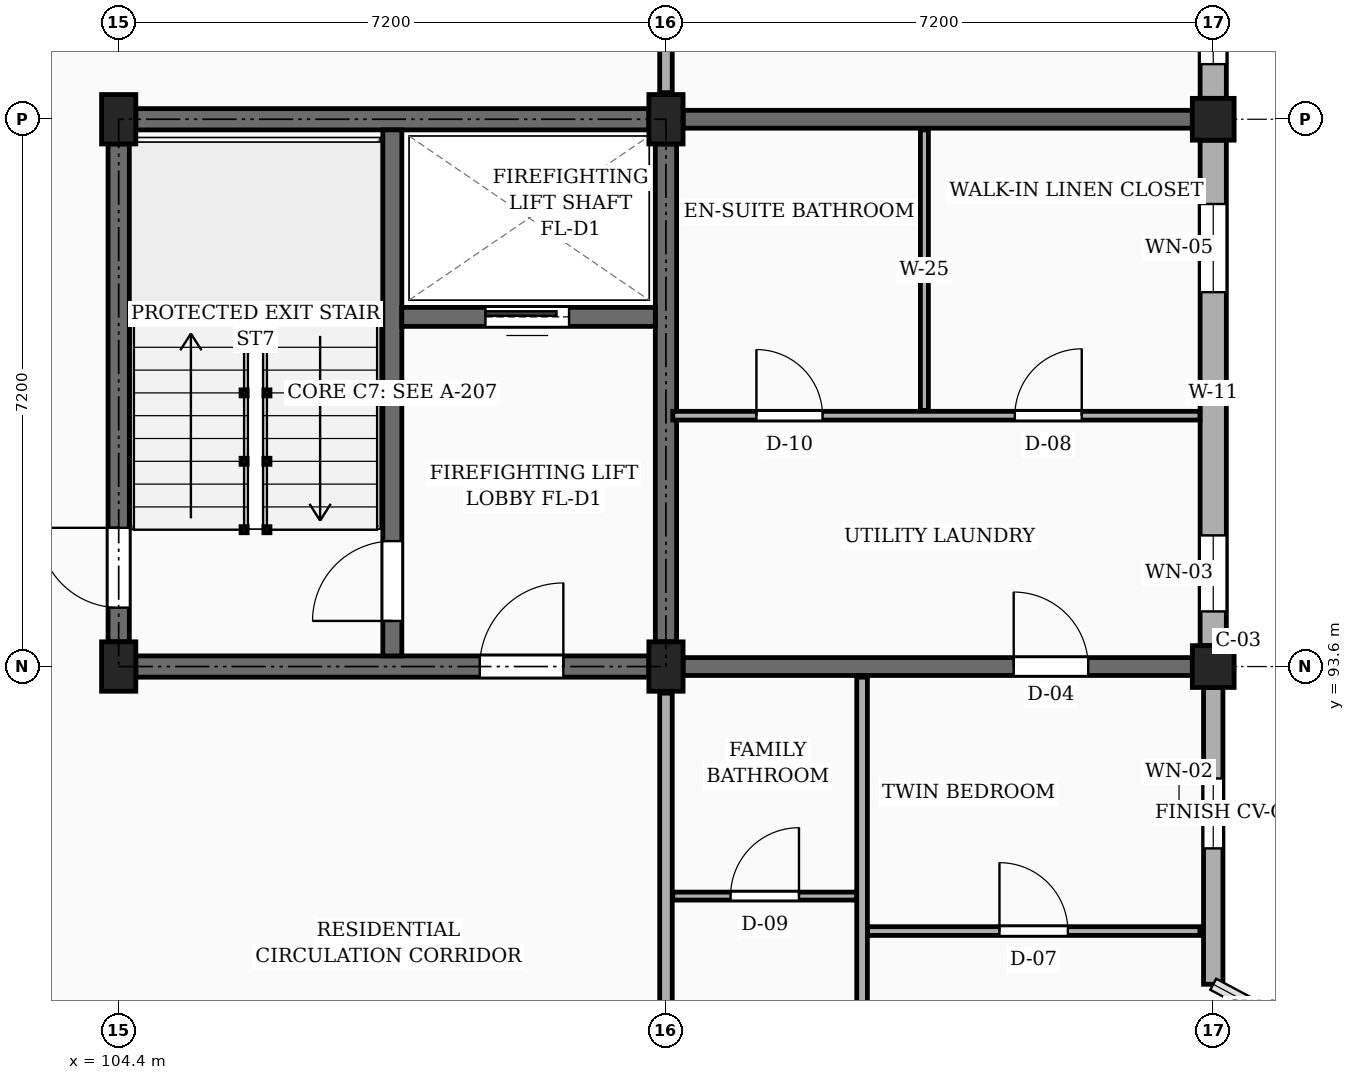
"""IFC4 building model, lengths in metres.
Left out: names, types, materials, properties, quantities, classifications, styles, units other than length and angle.
Written with IfcOpenShell. Run it as: python <this file> out.ifc"""

import sys

from ifc_helpers import new_model, si_unit, direction, frame, frame_2d, origin, origin_2d, place, context, subcontext, project, spatial, rectangle, extrude, element, fill, save


model = new_model("IFC4")
c1 = context("Model", 3, precision=1e-05, world=origin(), true_north=direction((0.0, 1.0)))
c2 = subcontext(c1, "Body", "Model", "MODEL_VIEW")
j1 = project(units=[si_unit("LENGTHUNIT", "METRE"), si_unit("PLANEANGLEUNIT", "RADIAN")], contexts=[c1])
p1 = place(None, origin())
s1 = spatial("IfcSite", under=j1, at=p1, CompositionType="ELEMENT")
p2 = place(p1, origin())
s2 = spatial("IfcBuilding", under=s1, at=p2, CompositionType="ELEMENT")
p3 = place(p2, frame((0.0, 0.0, 17.1)))
s3 = spatial("IfcBuildingStorey", under=s2, at=p3, CompositionType="ELEMENT", Elevation=17.1)
for number, where, z_axis, x_axis in (
    (1, (104.4, 93.6, 0.0), (0.0, 0.0, 1.0), (1.0, 0.0, 0.0)),
    (2, (104.4, 100.8, 0.0), (0.0, 0.0, 1.0), (1.0, 0.0, 0.0)),
    (3, (111.6, 93.6, 0.0), (0.0, 0.0, 1.0), (1.0, 0.0, 0.0)),
    (4, (111.6, 100.8, 0.0), (0.0, 0.0, 1.0), (1.0, 0.0, 0.0)),
):
    element("IfcColumn", number, at=place(p3, frame(where, z_axis=z_axis, x_axis=x_axis)), inside=s3, PredefinedType="COLUMN", context=c2, shape_type="SweptSolid", body=[
        extrude(rectangle(XDim=0.45, YDim=0.65, at=origin_2d()), origin(), (0.0, 0.0, 1.0), 3.15),
    ])
for number, where, z_axis, x_axis in (
    (5, (118.8, 93.6, 0.0), (0.0, 0.0, 1.0), (1.0, 0.0, 0.0)),
    (6, (118.8, 100.8, 0.0), (0.0, 0.0, 1.0), (1.0, 0.0, 0.0)),
):
    element("IfcColumn", number, at=place(p3, frame(where, z_axis=z_axis, x_axis=x_axis)), inside=s3, PredefinedType="COLUMN", context=c2, shape_type="SweptSolid", body=[
        extrude(rectangle(XDim=0.55, YDim=0.55, at=origin_2d()), origin(), (0.0, 0.0, 1.0), 3.15),
    ])
p4 = place(p3, frame((111.825, 93.6, 0.0), z_axis=(0.0, 0.0, 1.0), x_axis=(1.0, 0.0, 0.0)))
e7 = element("IfcWall", 7, at=p4, inside=s3, PredefinedType="SOLIDWALL", context=c2, shape_type="SweptSolid", body=[
    extrude(rectangle(XDim=6.7, YDim=0.235, at=frame_2d((3.35, 0.0))), origin(), (0.0, 0.0, 1.0), 2.19),
])
p5 = place(p4, frame((4.35, 0.0, 0.0)))
e8 = element("IfcOpeningElement", 8, at=p5, cuts=e7, PredefinedType="OPENING", context=c2, shape_type="SweptSolid", body=[
    extrude(rectangle(XDim=0.98, YDim=2.12, at=frame_2d((0.49, 1.06))), frame((0.0, 0.127, 0.0), z_axis=(0.0, -1.0, 0.0), x_axis=(1.0, 0.0, 0.0)), (0.0, 0.0, 1.0), 0.255),
])
p6 = place(p3, frame((111.825, 100.8, 0.0), z_axis=(0.0, 0.0, 1.0), x_axis=(1.0, 0.0, 0.0)))
e9 = element("IfcWall", 9, at=p6, inside=s3, PredefinedType="SOLIDWALL", context=c2, shape_type="SweptSolid", body=[
    extrude(rectangle(XDim=6.7, YDim=0.235, at=frame_2d((3.35, 0.0))), origin(), (0.0, 0.0, 1.0), 2.19),
])
p7 = place(p3, frame((118.8, 89.42, 0.0), z_axis=(0.0, 0.0, 1.0), x_axis=(0.0, 1.0, 0.0)))
e10 = element("IfcWall", 10, at=p7, inside=s3, PredefinedType="SOLIDWALL", context=c2, shape_type="SweptSolid", body=[
    extrude(rectangle(XDim=3.905, YDim=0.255, at=frame_2d((1.953, 0.0))), origin(), (0.0, 0.0, 1.0), 2.46),
])
p8 = place(p7, frame((1.788, 0.0, 0.78)))
e11 = element("IfcOpeningElement", 11, at=p8, cuts=e10, PredefinedType="OPENING", context=c2, shape_type="SweptSolid", body=[
    extrude(rectangle(XDim=0.92, YDim=1.15, at=frame_2d((0.46, 0.575))), frame((0.0, 0.137, 0.0), z_axis=(0.0, -1.0, 0.0), x_axis=(1.0, 0.0, 0.0)), (0.0, 0.0, 1.0), 0.275),
])
p9 = place(p3, frame((118.8, 93.875, 0.0), z_axis=(0.0, 0.0, 1.0), x_axis=(0.0, 1.0, 0.0)))
e12 = element("IfcWall", 12, at=p9, inside=s3, PredefinedType="SOLIDWALL", context=c2, shape_type="SweptSolid", body=[
    extrude(rectangle(XDim=6.65, YDim=0.345, at=frame_2d((3.325, 0.0))), origin(), (0.0, 0.0, 1.0), 2.46),
])
p10 = place(p9, frame((0.45, 0.0, 0.78)))
e13 = element("IfcOpeningElement", 13, at=p10, cuts=e12, PredefinedType="OPENING", context=c2, shape_type="SweptSolid", body=[
    extrude(rectangle(XDim=1.0, YDim=1.15, at=frame_2d((0.5, 0.575))), frame((0.0, 0.183, 0.0), z_axis=(0.0, -1.0, 0.0), x_axis=(1.0, 0.0, 0.0)), (0.0, 0.0, 1.0), 0.365),
])
p11 = place(p9, frame((4.65, 0.0, 0.78)))
e14 = element("IfcOpeningElement", 14, at=p11, cuts=e12, PredefinedType="OPENING", context=c2, shape_type="SweptSolid", body=[
    extrude(rectangle(XDim=1.16, YDim=1.15, at=frame_2d((0.58, 0.575))), frame((0.0, 0.183, 0.0), z_axis=(0.0, -1.0, 0.0), x_axis=(1.0, 0.0, 0.0)), (0.0, 0.0, 1.0), 0.365),
])
p12 = place(p3, frame((118.8, 101.075, 0.0), z_axis=(0.0, 0.0, 1.0), x_axis=(0.0, 1.0, 0.0)))
e15 = element("IfcWall", 15, at=p12, inside=s3, PredefinedType="SOLIDWALL", context=c2, shape_type="SweptSolid", body=[
    extrude(rectangle(XDim=6.65, YDim=0.345, at=frame_2d((3.325, 0.0))), origin(), (0.0, 0.0, 1.0), 2.46),
])
p13 = place(p12, frame((0.45, 0.0, 0.78)))
e16 = element("IfcOpeningElement", 16, at=p13, cuts=e15, PredefinedType="OPENING", context=c2, shape_type="SweptSolid", body=[
    extrude(rectangle(XDim=1.16, YDim=1.15, at=frame_2d((0.58, 0.575))), frame((0.0, 0.183, 0.0), z_axis=(0.0, -1.0, 0.0), x_axis=(1.0, 0.0, 0.0)), (0.0, 0.0, 1.0), 0.365),
])
p14 = place(p12, frame((4.65, 0.0, 0.78)))
e17 = element("IfcOpeningElement", 17, at=p14, cuts=e15, PredefinedType="OPENING", context=c2, shape_type="SweptSolid", body=[
    extrude(rectangle(XDim=1.32, YDim=1.15, at=frame_2d((0.66, 0.575))), frame((0.0, 0.183, 0.0), z_axis=(0.0, -1.0, 0.0), x_axis=(1.0, 0.0, 0.0)), (0.0, 0.0, 1.0), 0.365),
])
p15 = place(p3, frame((104.4, 93.925, 0.0), z_axis=(0.0, 0.0, 1.0), x_axis=(0.0, 1.0, 0.0)))
e18 = element("IfcWall", 18, at=p15, inside=s3, PredefinedType="SHEAR", context=c2, shape_type="SweptSolid", body=[
    extrude(rectangle(XDim=6.55, YDim=0.28, at=frame_2d((3.275, 0.0))), origin(), (0.0, 0.0, 1.0), 2.89),
])
p16 = place(p15, frame((0.45, 0.0, 0.0)))
e19 = element("IfcOpeningElement", 19, at=p16, cuts=e18, PredefinedType="OPENING", context=c2, shape_type="SweptSolid", body=[
    extrude(rectangle(XDim=1.05, YDim=2.15, at=frame_2d((0.525, 1.075))), frame((0.0, 0.15, 0.0), z_axis=(0.0, -1.0, 0.0), x_axis=(1.0, 0.0, 0.0)), (0.0, 0.0, 1.0), 0.3),
])
p17 = place(p3, frame((104.625, 100.8, 0.0), z_axis=(0.0, 0.0, 1.0), x_axis=(1.0, 0.0, 0.0)))
e20 = element("IfcWall", 20, at=p17, inside=s3, PredefinedType="SHEAR", context=c2, shape_type="SweptSolid", body=[
    extrude(rectangle(XDim=6.75, YDim=0.28, at=frame_2d((3.375, 0.0))), origin(), (0.0, 0.0, 1.0), 2.89),
])
p18 = place(p3, frame((111.6, 93.925, 0.0), z_axis=(0.0, 0.0, 1.0), x_axis=(0.0, 1.0, 0.0)))
e21 = element("IfcWall", 21, at=p18, inside=s3, PredefinedType="SHEAR", context=c2, shape_type="SweptSolid", body=[
    extrude(rectangle(XDim=6.55, YDim=0.28, at=frame_2d((3.275, 0.0))), origin(), (0.0, 0.0, 1.0), 2.89),
])
p19 = place(p3, frame((104.625, 93.6, 0.0), z_axis=(0.0, 0.0, 1.0), x_axis=(1.0, 0.0, 0.0)))
e22 = element("IfcWall", 22, at=p19, inside=s3, PredefinedType="SHEAR", context=c2, shape_type="SweptSolid", body=[
    extrude(rectangle(XDim=6.75, YDim=0.28, at=frame_2d((3.375, 0.0))), origin(), (0.0, 0.0, 1.0), 2.89),
])
p20 = place(p19, frame((4.525, 0.0, 0.0)))
e23 = element("IfcOpeningElement", 23, at=p20, cuts=e22, PredefinedType="OPENING", context=c2, shape_type="SweptSolid", body=[
    extrude(rectangle(XDim=1.1, YDim=2.15, at=frame_2d((0.55, 1.075))), frame((0.0, 0.15, 0.0), z_axis=(0.0, -1.0, 0.0), x_axis=(1.0, 0.0, 0.0)), (0.0, 0.0, 1.0), 0.3),
])
p21 = place(p3, frame((108.0, 93.74, 0.0), z_axis=(0.0, 0.0, 1.0), x_axis=(0.0, 1.0, 0.0)))
e24 = element("IfcWall", 24, at=p21, inside=s3, PredefinedType="SHEAR", context=c2, shape_type="SweptSolid", body=[
    extrude(rectangle(XDim=6.92, YDim=0.25, at=frame_2d((3.46, 0.0))), origin(), (0.0, 0.0, 1.0), 2.89),
])
p22 = place(p21, frame((0.46, 0.0, 0.0)))
e25 = element("IfcOpeningElement", 25, at=p22, cuts=e24, PredefinedType="OPENING", context=c2, shape_type="SweptSolid", body=[
    extrude(rectangle(XDim=1.05, YDim=2.15, at=frame_2d((0.525, 1.075))), frame((0.0, 0.135, 0.0), z_axis=(0.0, -1.0, 0.0), x_axis=(1.0, 0.0, 0.0)), (0.0, 0.0, 1.0), 0.27),
])
p23 = place(p3, frame((108.125, 98.2, 0.0), z_axis=(0.0, 0.0, 1.0), x_axis=(1.0, 0.0, 0.0)))
e26 = element("IfcWall", 26, at=p23, inside=s3, PredefinedType="SHEAR", context=c2, shape_type="SweptSolid", body=[
    extrude(rectangle(XDim=3.335, YDim=0.25, at=frame_2d((1.667, 0.0))), origin(), (0.0, 0.0, 1.0), 2.89),
])
p24 = place(p23, frame((1.1, 0.0, 0.0)))
e27 = element("IfcOpeningElement", 27, at=p24, cuts=e26, PredefinedType="OPENING", context=c2, shape_type="SweptSolid", body=[
    extrude(rectangle(XDim=1.1, YDim=2.2, at=frame_2d((0.55, 1.1))), frame((0.0, 0.135, 0.0), z_axis=(0.0, -1.0, 0.0), x_axis=(1.0, 0.0, 0.0)), (0.0, 0.0, 1.0), 0.27),
])
p25 = place(p3, frame((111.6, 86.75, 0.0), z_axis=(0.0, 0.0, 1.0), x_axis=(0.0, 1.0, 0.0)))
e28 = element("IfcWall", 28, at=p25, inside=s3, PredefinedType="PARTITIONING", context=c2, shape_type="SweptSolid", body=[
    extrude(rectangle(XDim=6.5, YDim=0.165, at=frame_2d((3.25, 0.0))), origin(), (0.0, 0.0, 1.0), 2.325),
])
p26 = place(p25, frame((1.0, 0.0, 0.0)))
e29 = element("IfcOpeningElement", 29, at=p26, cuts=e28, PredefinedType="OPENING", context=c2, shape_type="SweptSolid", body=[
    extrude(rectangle(XDim=1.14, YDim=2.18, at=frame_2d((0.57, 1.09))), frame((0.0, 0.093, 0.0), z_axis=(0.0, -1.0, 0.0), x_axis=(1.0, 0.0, 0.0)), (0.0, 0.0, 1.0), 0.185),
])
p27 = place(p3, frame((111.6, 101.15, 0.0), z_axis=(0.0, 0.0, 1.0), x_axis=(0.0, 1.0, 0.0)))
e30 = element("IfcWall", 30, at=p27, inside=s3, PredefinedType="PARTITIONING", context=c2, shape_type="SweptSolid", body=[
    extrude(rectangle(XDim=6.5, YDim=0.165, at=frame_2d((3.25, 0.0))), origin(), (0.0, 0.0, 1.0), 2.325),
])
p28 = place(p27, frame((1.1, 0.0, 0.0)))
e31 = element("IfcOpeningElement", 31, at=p28, cuts=e30, PredefinedType="OPENING", context=c2, shape_type="SweptSolid", body=[
    extrude(rectangle(XDim=1.0, YDim=2.15, at=frame_2d((0.5, 1.075))), frame((0.0, 0.093, 0.0), z_axis=(0.0, -1.0, 0.0), x_axis=(1.0, 0.0, 0.0)), (0.0, 0.0, 1.0), 0.185),
])
p29 = place(p3, frame((114.25, 90.12, 0.0), z_axis=(0.0, 0.0, 1.0), x_axis=(1.0, 0.0, 0.0)))
e32 = element("IfcWall", 32, at=p29, inside=s3, PredefinedType="PARTITIONING", context=c2, shape_type="SweptSolid", body=[
    extrude(rectangle(XDim=4.375, YDim=0.115, at=frame_2d((2.188, 0.0))), origin(), (0.0, 0.0, 1.0), 2.325),
])
p30 = place(p29, frame((1.738, 0.0, 0.0)))
e33 = element("IfcOpeningElement", 33, at=p30, cuts=e32, PredefinedType="OPENING", context=c2, shape_type="SweptSolid", body=[
    extrude(rectangle(XDim=0.9, YDim=2.1, at=frame_2d((0.45, 1.05))), frame((0.0, 0.067, 0.0), z_axis=(0.0, -1.0, 0.0), x_axis=(1.0, 0.0, 0.0)), (0.0, 0.0, 1.0), 0.135),
])
p31 = place(p3, frame((111.69, 90.58, 0.0), z_axis=(0.0, 0.0, 1.0), x_axis=(1.0, 0.0, 0.0)))
e34 = element("IfcWall", 34, at=p31, inside=s3, PredefinedType="PARTITIONING", context=c2, shape_type="SweptSolid", body=[
    extrude(rectangle(XDim=2.42, YDim=0.105, at=frame_2d((1.21, 0.0))), origin(), (0.0, 0.0, 1.0), 2.325),
])
p32 = place(p31, frame((0.76, 0.0, 0.0)))
e35 = element("IfcOpeningElement", 35, at=p32, cuts=e34, PredefinedType="OPENING", context=c2, shape_type="SweptSolid", body=[
    extrude(rectangle(XDim=0.9, YDim=2.05, at=frame_2d((0.45, 1.025))), frame((0.0, 0.062, 0.0), z_axis=(0.0, -1.0, 0.0), x_axis=(1.0, 0.0, 0.0)), (0.0, 0.0, 1.0), 0.125),
])
p33 = place(p3, frame((114.18, 86.575, 0.0), z_axis=(0.0, 0.0, 1.0), x_axis=(0.0, 1.0, 0.0)))
e36 = element("IfcWall", 36, at=p33, inside=s3, PredefinedType="PARTITIONING", context=c2, shape_type="SweptSolid", body=[
    extrude(rectangle(XDim=6.885, YDim=0.14, at=frame_2d((3.442, 0.0))), origin(), (0.0, 0.0, 1.0), 2.325),
])
p34 = place(p33, frame((1.275, 0.0, 0.0)))
e37 = element("IfcOpeningElement", 37, at=p34, cuts=e36, PredefinedType="OPENING", context=c2, shape_type="SweptSolid", body=[
    extrude(rectangle(XDim=0.95, YDim=2.1, at=frame_2d((0.475, 1.05))), frame((0.0, 0.08, 0.0), z_axis=(0.0, -1.0, 0.0), x_axis=(1.0, 0.0, 0.0)), (0.0, 0.0, 1.0), 0.16),
])
p35 = place(p3, frame((111.69, 96.9, 0.0), z_axis=(0.0, 0.0, 1.0), x_axis=(1.0, 0.0, 0.0)))
e38 = element("IfcWall", 38, at=p35, inside=s3, PredefinedType="PARTITIONING", context=c2, shape_type="SweptSolid", body=[
    extrude(rectangle(XDim=6.935, YDim=0.115, at=frame_2d((3.468, 0.0))), origin(), (0.0, 0.0, 1.0), 2.325),
])
p36 = place(p35, frame((1.1, 0.0, 0.0)))
e39 = element("IfcOpeningElement", 39, at=p36, cuts=e38, PredefinedType="OPENING", context=c2, shape_type="SweptSolid", body=[
    extrude(rectangle(XDim=0.87, YDim=2.05, at=frame_2d((0.435, 1.025))), frame((0.0, 0.067, 0.0), z_axis=(0.0, -1.0, 0.0), x_axis=(1.0, 0.0, 0.0)), (0.0, 0.0, 1.0), 0.135),
])
p37 = place(p35, frame((4.5, 0.0, 0.0)))
e40 = element("IfcOpeningElement", 40, at=p37, cuts=e38, PredefinedType="OPENING", context=c2, shape_type="SweptSolid", body=[
    extrude(rectangle(XDim=0.88, YDim=2.08, at=frame_2d((0.44, 1.04))), frame((0.0, 0.067, 0.0), z_axis=(0.0, -1.0, 0.0), x_axis=(1.0, 0.0, 0.0)), (0.0, 0.0, 1.0), 0.135),
])
p38 = place(p3, frame((115.0, 96.97, 0.0), z_axis=(0.0, 0.0, 1.0), x_axis=(0.0, 1.0, 0.0)))
e41 = element("IfcWall", 41, at=p38, inside=s3, PredefinedType="PARTITIONING", context=c2, shape_type="SweptSolid", body=[
    extrude(rectangle(XDim=3.69, YDim=0.105, at=frame_2d((1.845, 0.0))), origin(), (0.0, 0.0, 1.0), 2.325),
])
p39 = place(p8, origin())
e42 = element("IfcWindow", 42, at=p39, inside=s3, PartitioningType="SINGLE_PANEL", PredefinedType="WINDOW", context=c2, shape_type="SweptSolid", body=[
    extrude(rectangle(XDim=0.92, YDim=1.15, at=frame_2d((0.46, 0.575))), frame((0.0, 0.03, 0.0), z_axis=(0.0, -1.0, 0.0), x_axis=(1.0, 0.0, 0.0)), (0.0, 0.0, 1.0), 0.06),
])
fill(e11, e42)
p40 = place(p10, origin())
e43 = element("IfcWindow", 43, at=p40, inside=s3, PartitioningType="SINGLE_PANEL", PredefinedType="WINDOW", context=c2, shape_type="SweptSolid", body=[
    extrude(rectangle(XDim=1.0, YDim=1.15, at=frame_2d((0.5, 0.575))), frame((0.0, 0.03, 0.0), z_axis=(0.0, -1.0, 0.0), x_axis=(1.0, 0.0, 0.0)), (0.0, 0.0, 1.0), 0.06),
])
fill(e13, e43)
p41 = place(p11, origin())
e44 = element("IfcWindow", 44, at=p41, inside=s3, PartitioningType="SINGLE_PANEL", PredefinedType="WINDOW", context=c2, shape_type="SweptSolid", body=[
    extrude(rectangle(XDim=1.16, YDim=1.15, at=frame_2d((0.58, 0.575))), frame((0.0, 0.03, 0.0), z_axis=(0.0, -1.0, 0.0), x_axis=(1.0, 0.0, 0.0)), (0.0, 0.0, 1.0), 0.06),
])
fill(e14, e44)
p42 = place(p13, origin())
e45 = element("IfcWindow", 45, at=p42, inside=s3, PartitioningType="SINGLE_PANEL", PredefinedType="WINDOW", context=c2, shape_type="SweptSolid", body=[
    extrude(rectangle(XDim=1.16, YDim=1.15, at=frame_2d((0.58, 0.575))), frame((0.0, 0.03, 0.0), z_axis=(0.0, -1.0, 0.0), x_axis=(1.0, 0.0, 0.0)), (0.0, 0.0, 1.0), 0.06),
])
fill(e16, e45)
p43 = place(p16, origin())
e46 = element("IfcDoor", 46, at=p43, inside=s3, OperationType="SINGLE_SWING_RIGHT", PredefinedType="DOOR", context=c2, shape_type="SweptSolid", body=[
    extrude(rectangle(XDim=1.05, YDim=2.15, at=frame_2d((0.525, 1.075))), frame((0.0, 0.025, 0.0), z_axis=(0.0, -1.0, 0.0), x_axis=(1.0, 0.0, 0.0)), (0.0, 0.0, 1.0), 0.05),
])
fill(e19, e46)
p44 = place(p20, frame((1.1, 0.0, 0.0), z_axis=(0.0, 0.0, 1.0), x_axis=(-1.0, 0.0, 0.0)))
e47 = element("IfcDoor", 47, at=p44, inside=s3, OperationType="SINGLE_SWING_RIGHT", PredefinedType="DOOR", context=c2, shape_type="SweptSolid", body=[
    extrude(rectangle(XDim=1.1, YDim=2.15, at=frame_2d((0.55, 1.075))), frame((0.0, 0.025, 0.0), z_axis=(0.0, -1.0, 0.0), x_axis=(1.0, 0.0, 0.0)), (0.0, 0.0, 1.0), 0.05),
])
fill(e23, e47)
p45 = place(p22, origin())
e48 = element("IfcDoor", 48, at=p45, inside=s3, OperationType="SINGLE_SWING_LEFT", PredefinedType="DOOR", context=c2, shape_type="SweptSolid", body=[
    extrude(rectangle(XDim=1.05, YDim=2.15, at=frame_2d((0.525, 1.075))), frame((0.0, 0.025, 0.0), z_axis=(0.0, -1.0, 0.0), x_axis=(1.0, 0.0, 0.0)), (0.0, 0.0, 1.0), 0.05),
])
fill(e25, e48)
p46 = place(p24, origin())
e49 = element("IfcDoor", 49, at=p46, inside=s3, OperationType="SLIDING_TO_LEFT", PredefinedType="DOOR", context=c2, shape_type="SweptSolid", body=[
    extrude(rectangle(XDim=1.1, YDim=2.2, at=frame_2d((0.55, 1.1))), frame((0.0, 0.025, 0.0), z_axis=(0.0, -1.0, 0.0), x_axis=(1.0, 0.0, 0.0)), (0.0, 0.0, 1.0), 0.05),
])
fill(e27, e49)
p47 = place(p30, origin())
e50 = element("IfcDoor", 50, at=p47, inside=s3, OperationType="SINGLE_SWING_LEFT", PredefinedType="DOOR", context=c2, shape_type="SweptSolid", body=[
    extrude(rectangle(XDim=0.9, YDim=2.1, at=frame_2d((0.45, 1.05))), frame((0.0, 0.025, 0.0), z_axis=(0.0, -1.0, 0.0), x_axis=(1.0, 0.0, 0.0)), (0.0, 0.0, 1.0), 0.05),
])
fill(e33, e50)
p48 = place(p32, origin())
e51 = element("IfcDoor", 51, at=p48, inside=s3, OperationType="SINGLE_SWING_RIGHT", PredefinedType="DOOR", context=c2, shape_type="SweptSolid", body=[
    extrude(rectangle(XDim=0.9, YDim=2.05, at=frame_2d((0.45, 1.025))), frame((0.0, 0.025, 0.0), z_axis=(0.0, -1.0, 0.0), x_axis=(1.0, 0.0, 0.0)), (0.0, 0.0, 1.0), 0.05),
])
fill(e35, e51)
p49 = place(p36, origin())
e52 = element("IfcDoor", 52, at=p49, inside=s3, OperationType="SINGLE_SWING_LEFT", PredefinedType="DOOR", context=c2, shape_type="SweptSolid", body=[
    extrude(rectangle(XDim=0.87, YDim=2.05, at=frame_2d((0.435, 1.025))), frame((0.0, 0.025, 0.0), z_axis=(0.0, -1.0, 0.0), x_axis=(1.0, 0.0, 0.0)), (0.0, 0.0, 1.0), 0.05),
])
fill(e39, e52)
p50 = place(p37, origin())
e53 = element("IfcDoor", 53, at=p50, inside=s3, OperationType="SINGLE_SWING_RIGHT", PredefinedType="DOOR", context=c2, shape_type="SweptSolid", body=[
    extrude(rectangle(XDim=0.88, YDim=2.08, at=frame_2d((0.44, 1.04))), frame((0.0, 0.025, 0.0), z_axis=(0.0, -1.0, 0.0), x_axis=(1.0, 0.0, 0.0)), (0.0, 0.0, 1.0), 0.05),
])
fill(e40, e53)
p51 = place(p5, origin())
e54 = element("IfcDoor", 54, at=p51, inside=s3, OperationType="SINGLE_SWING_LEFT", PredefinedType="DOOR", context=c2, shape_type="SweptSolid", body=[
    extrude(rectangle(XDim=0.98, YDim=2.12, at=frame_2d((0.49, 1.06))), frame((0.0, 0.025, 0.0), z_axis=(0.0, -1.0, 0.0), x_axis=(1.0, 0.0, 0.0)), (0.0, 0.0, 1.0), 0.05),
])
fill(e8, e54)
save(model, sys.argv[1])
